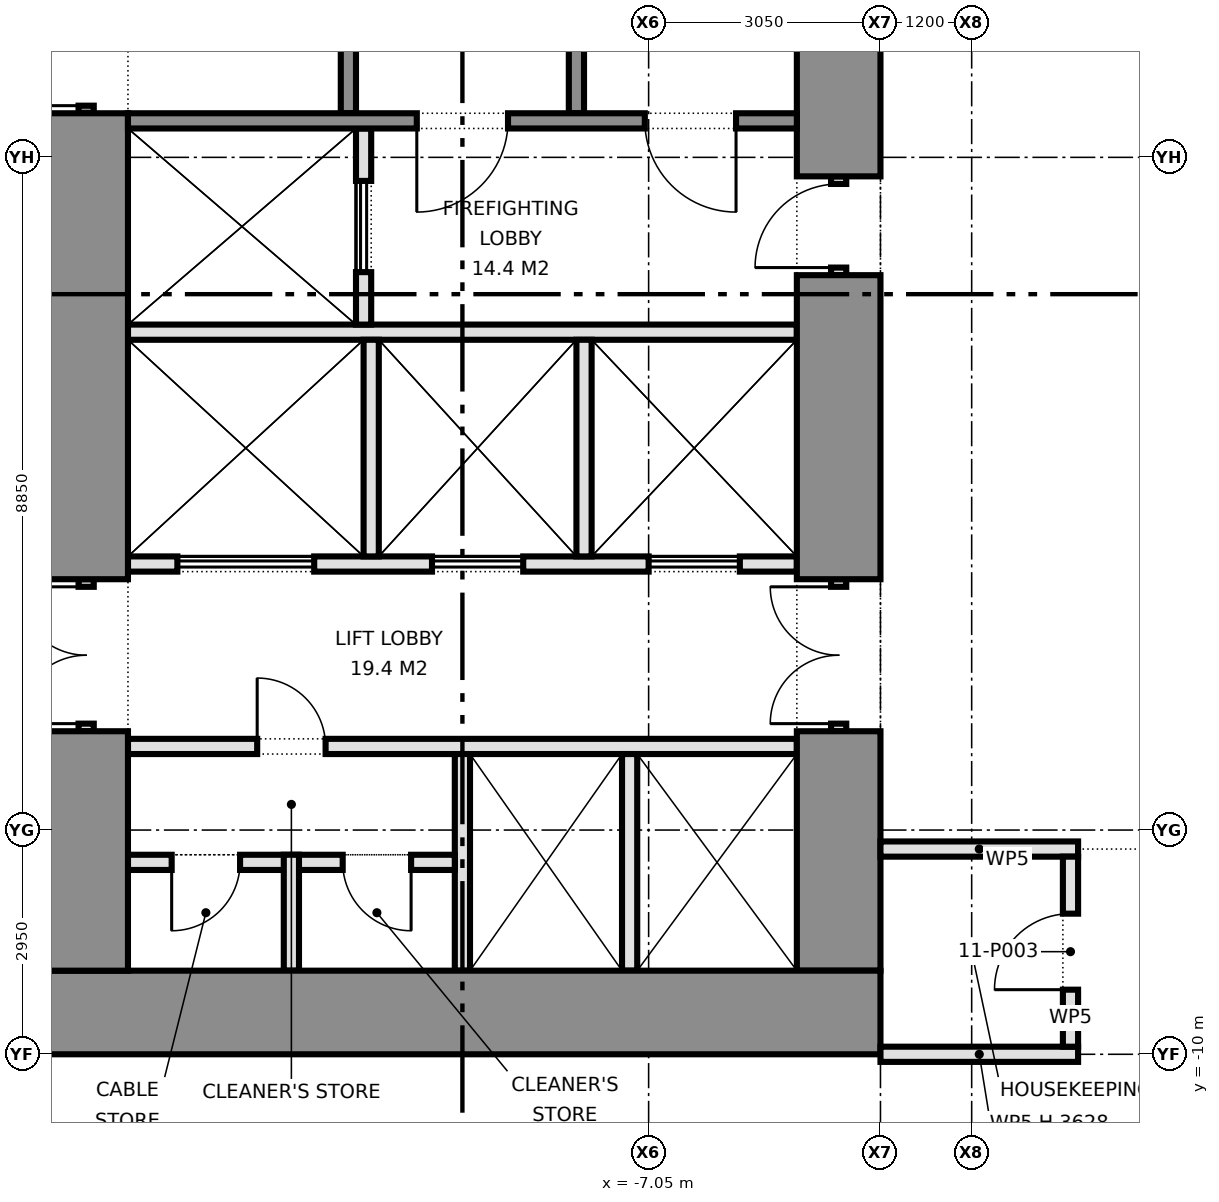
"""IFC4 building model, lengths in metres.
Left out: names, types, materials, properties, quantities, classifications, styles, units other than length and angle.
Written with IfcOpenShell. Run it as: python <this file> out.ifc"""

import sys

from ifc_helpers import new_model, si_unit, direction, frame, frame_2d, origin, place, context, subcontext, project, spatial, rectangle, extrude, element, fill, save


model = new_model("IFC4")
c1 = context("Model", 3, precision=1e-05, world=origin(), true_north=direction((0.0, 1.0)))
c2 = subcontext(c1, "Body", "Model", "MODEL_VIEW")
j1 = project(units=[si_unit("LENGTHUNIT", "METRE"), si_unit("PLANEANGLEUNIT", "RADIAN")], contexts=[c1])
p1 = place(None, origin())
s1 = spatial("IfcSite", under=j1, at=p1, CompositionType="ELEMENT")
p2 = place(p1, origin())
s2 = spatial("IfcBuilding", under=s1, at=p2, CompositionType="ELEMENT")
p3 = place(p2, frame((0.0, 0.0, 49.7)))
s3 = spatial("IfcBuildingStorey", under=s2, at=p3, CompositionType="ELEMENT", Elevation=49.7)
p4 = place(p3, frame((-15.0, -9.45, 0.0), z_axis=(0.0, 0.0, 1.0), x_axis=(1.0, 0.0, 0.0)))
e1 = element("IfcWall", 1, at=p4, inside=s3, PredefinedType="SHEAR", context=c2, shape_type="SweptSolid", body=[
    extrude(rectangle(XDim=11.0, YDim=1.1, at=frame_2d((5.5, 0.0))), origin(), (0.0, 0.0, 1.0), 4.575),
])
p5 = place(p3, frame((-14.45, -8.9, 0.0), z_axis=(0.0, 0.0, 1.0), x_axis=(0.0, 1.0, 0.0)))
e2 = element("IfcWall", 2, at=p5, inside=s3, PredefinedType="SHEAR", context=c2, shape_type="SweptSolid", body=[
    extrude(rectangle(XDim=3.15, YDim=1.1, at=frame_2d((1.575, 0.0))), origin(), (0.0, 0.0, 1.0), 4.575),
])
p6 = place(p3, frame((-14.45, -5.75, 0.0), z_axis=(0.0, 0.0, 1.0), x_axis=(0.0, 1.0, 0.0)))
e3 = element("IfcWall", 3, at=p6, inside=s3, PredefinedType="PARTITIONING", context=c2, shape_type="SweptSolid", body=[
    extrude(rectangle(XDim=2.0, YDim=0.2, at=frame_2d((1.0, 0.0))), origin(), (0.0, 0.0, 1.0), 2.4),
])
p7 = place(p6, frame((0.1, 0.0, 0.0)))
e4 = element("IfcOpeningElement", 4, at=p7, cuts=e3, PredefinedType="OPENING", context=c2, shape_type="SweptSolid", body=[
    extrude(rectangle(XDim=1.8, YDim=2.1, at=frame_2d((0.9, 1.05))), frame((0.0, 0.11, 0.0), z_axis=(0.0, -1.0, 0.0), x_axis=(1.0, 0.0, 0.0)), (0.0, 0.0, 1.0), 0.22),
])
p8 = place(p3, frame((-14.45, -3.75, 0.0), z_axis=(0.0, 0.0, 1.0), x_axis=(0.0, 1.0, 0.0)))
e5 = element("IfcWall", 5, at=p8, inside=s3, PredefinedType="SHEAR", context=c2, shape_type="SweptSolid", body=[
    extrude(rectangle(XDim=6.13, YDim=1.1, at=frame_2d((3.065, 0.0))), origin(), (0.0, 0.0, 1.0), 4.575),
])
p9 = place(p3, frame((-14.45, 2.38, 0.0), z_axis=(0.0, 0.0, 1.0), x_axis=(0.0, 1.0, 0.0)))
e6 = element("IfcWall", 6, at=p9, inside=s3, PredefinedType="SHEAR", context=c2, shape_type="SweptSolid", body=[
    extrude(rectangle(XDim=1.3, YDim=0.2, at=frame_2d((0.65, 0.0))), origin(), (0.0, 0.0, 1.0), 2.4),
])
p10 = place(p9, frame((0.1, 0.0, 0.0)))
e7 = element("IfcOpeningElement", 7, at=p10, cuts=e6, PredefinedType="OPENING", context=c2, shape_type="SweptSolid", body=[
    extrude(rectangle(XDim=1.1, YDim=2.1, at=frame_2d((0.55, 1.05))), frame((0.0, 0.11, 0.0), z_axis=(0.0, -1.0, 0.0), x_axis=(1.0, 0.0, 0.0)), (0.0, 0.0, 1.0), 0.22),
])
p11 = place(p3, frame((-4.55, -8.9, 0.0), z_axis=(0.0, 0.0, 1.0), x_axis=(0.0, 1.0, 0.0)))
e8 = element("IfcWall", 8, at=p11, inside=s3, PredefinedType="SHEAR", context=c2, shape_type="SweptSolid", body=[
    extrude(rectangle(XDim=3.15, YDim=1.1, at=frame_2d((1.575, 0.0))), origin(), (0.0, 0.0, 1.0), 4.575),
])
p12 = place(p3, frame((-4.55, -5.75, 0.0), z_axis=(0.0, 0.0, 1.0), x_axis=(0.0, 1.0, 0.0)))
e9 = element("IfcWall", 9, at=p12, inside=s3, PredefinedType="PARTITIONING", context=c2, shape_type="SweptSolid", body=[
    extrude(rectangle(XDim=2.0, YDim=0.2, at=frame_2d((1.0, 0.0))), origin(), (0.0, 0.0, 1.0), 2.4),
])
p13 = place(p12, frame((0.1, 0.0, 0.0)))
e10 = element("IfcOpeningElement", 10, at=p13, cuts=e9, PredefinedType="OPENING", context=c2, shape_type="SweptSolid", body=[
    extrude(rectangle(XDim=1.8, YDim=2.1, at=frame_2d((0.9, 1.05))), frame((0.0, 0.11, 0.0), z_axis=(0.0, -1.0, 0.0), x_axis=(1.0, 0.0, 0.0)), (0.0, 0.0, 1.0), 0.22),
])
p14 = place(p3, frame((-4.55, -3.75, 0.0), z_axis=(0.0, 0.0, 1.0), x_axis=(0.0, 1.0, 0.0)))
e11 = element("IfcWall", 11, at=p14, inside=s3, PredefinedType="SHEAR", context=c2, shape_type="SweptSolid", body=[
    extrude(rectangle(XDim=4.0, YDim=1.1, at=frame_2d((2.0, 0.0))), origin(), (0.0, 0.0, 1.0), 4.575),
])
p15 = place(p3, frame((-4.55, 0.25, 0.0), z_axis=(0.0, 0.0, 1.0), x_axis=(0.0, 1.0, 0.0)))
e12 = element("IfcWall", 12, at=p15, inside=s3, PredefinedType="PARTITIONING", context=c2, shape_type="SweptSolid", body=[
    extrude(rectangle(XDim=1.3, YDim=0.2, at=frame_2d((0.65, 0.0))), origin(), (0.0, 0.0, 1.0), 2.4),
])
p16 = place(p15, frame((0.1, 0.0, 0.0)))
e13 = element("IfcOpeningElement", 13, at=p16, cuts=e12, PredefinedType="OPENING", context=c2, shape_type="SweptSolid", body=[
    extrude(rectangle(XDim=1.1, YDim=2.1, at=frame_2d((0.55, 1.05))), frame((0.0, 0.11, 0.0), z_axis=(0.0, -1.0, 0.0), x_axis=(1.0, 0.0, 0.0)), (0.0, 0.0, 1.0), 0.22),
])
p17 = place(p3, frame((-4.55, 1.55, 0.0), z_axis=(0.0, 0.0, 1.0), x_axis=(0.0, 1.0, 0.0)))
e14 = element("IfcWall", 14, at=p17, inside=s3, PredefinedType="SHEAR", context=c2, shape_type="SweptSolid", body=[
    extrude(rectangle(XDim=7.35, YDim=1.1, at=frame_2d((3.675, 0.0))), origin(), (0.0, 0.0, 1.0), 4.575),
])
p18 = place(p3, frame((-13.9, -5.95, 0.0), z_axis=(0.0, 0.0, 1.0), x_axis=(1.0, 0.0, 0.0)))
e15 = element("IfcWall", 15, at=p18, inside=s3, PredefinedType="PARTITIONING", context=c2, shape_type="SweptSolid", body=[
    extrude(rectangle(XDim=8.8, YDim=0.2, at=frame_2d((4.4, 0.0))), origin(), (0.0, 0.0, 1.0), 4.575),
])
p19 = place(p18, frame((1.7, 0.0, 0.0)))
e16 = element("IfcOpeningElement", 16, at=p19, cuts=e15, PredefinedType="OPENING", context=c2, shape_type="SweptSolid", body=[
    extrude(rectangle(XDim=0.9, YDim=2.1, at=frame_2d((0.45, 1.05))), frame((0.0, 0.11, 0.0), z_axis=(0.0, -1.0, 0.0), x_axis=(1.0, 0.0, 0.0)), (0.0, 0.0, 1.0), 0.22),
])
p20 = place(p3, frame((-13.9, -3.55, 0.0), z_axis=(0.0, 0.0, 1.0), x_axis=(1.0, 0.0, 0.0)))
e17 = element("IfcWall", 17, at=p20, inside=s3, PredefinedType="PARTITIONING", context=c2, shape_type="SweptSolid", body=[
    extrude(rectangle(XDim=8.8, YDim=0.2, at=frame_2d((4.4, 0.0))), origin(), (0.0, 0.0, 1.0), 4.575),
])
p21 = place(p20, frame((0.65, 0.0, 0.0)))
e18 = element("IfcOpeningElement", 18, at=p21, cuts=e17, PredefinedType="OPENING", context=c2, shape_type="SweptSolid", body=[
    extrude(rectangle(XDim=1.8, YDim=2.1, at=frame_2d((0.9, 1.05))), frame((0.0, 0.11, 0.0), z_axis=(0.0, -1.0, 0.0), x_axis=(1.0, 0.0, 0.0)), (0.0, 0.0, 1.0), 0.22),
])
p22 = place(p20, frame((4.0, 0.0, 0.0)))
e19 = element("IfcOpeningElement", 19, at=p22, cuts=e17, PredefinedType="OPENING", context=c2, shape_type="SweptSolid", body=[
    extrude(rectangle(XDim=1.2, YDim=2.1, at=frame_2d((0.6, 1.05))), frame((0.0, 0.11, 0.0), z_axis=(0.0, -1.0, 0.0), x_axis=(1.0, 0.0, 0.0)), (0.0, 0.0, 1.0), 0.22),
])
p23 = place(p20, frame((6.85, 0.0, 0.0)))
e20 = element("IfcOpeningElement", 20, at=p23, cuts=e17, PredefinedType="OPENING", context=c2, shape_type="SweptSolid", body=[
    extrude(rectangle(XDim=1.2, YDim=2.1, at=frame_2d((0.6, 1.05))), frame((0.0, 0.11, 0.0), z_axis=(0.0, -1.0, 0.0), x_axis=(1.0, 0.0, 0.0)), (0.0, 0.0, 1.0), 0.22),
])
p24 = place(p3, frame((-13.9, -0.5, 0.0), z_axis=(0.0, 0.0, 1.0), x_axis=(1.0, 0.0, 0.0)))
e21 = element("IfcWall", 21, at=p24, inside=s3, PredefinedType="PARTITIONING", context=c2, shape_type="SweptSolid", body=[
    extrude(rectangle(XDim=8.8, YDim=0.2, at=frame_2d((4.4, 0.0))), origin(), (0.0, 0.0, 1.0), 4.575),
])
p25 = place(p3, frame((-10.8, -0.4, 0.0), z_axis=(0.0, 0.0, 1.0), x_axis=(0.0, 1.0, 0.0)))
e22 = element("IfcWall", 22, at=p25, inside=s3, PredefinedType="PARTITIONING", context=c2, shape_type="SweptSolid", body=[
    extrude(rectangle(XDim=2.58, YDim=0.2, at=frame_2d((1.29, 0.0))), origin(), (0.0, 0.0, 1.0), 4.575),
])
p26 = place(p25, frame((0.69, 0.0, 0.0)))
e23 = element("IfcOpeningElement", 23, at=p26, cuts=e22, PredefinedType="OPENING", context=c2, shape_type="SweptSolid", body=[
    extrude(rectangle(XDim=1.2, YDim=2.1, at=frame_2d((0.6, 1.05))), frame((0.0, 0.11, 0.0), z_axis=(0.0, -1.0, 0.0), x_axis=(1.0, 0.0, 0.0)), (0.0, 0.0, 1.0), 0.22),
])
p27 = place(p3, frame((-13.9, 2.28, 0.0), z_axis=(0.0, 0.0, 1.0), x_axis=(1.0, 0.0, 0.0)))
e24 = element("IfcWall", 24, at=p27, inside=s3, PredefinedType="SHEAR", context=c2, shape_type="SweptSolid", body=[
    extrude(rectangle(XDim=8.8, YDim=0.2, at=frame_2d((4.4, 0.0))), origin(), (0.0, 0.0, 1.0), 4.575),
])
p28 = place(p27, frame((3.8, 0.0, 0.0)))
e25 = element("IfcOpeningElement", 25, at=p28, cuts=e24, PredefinedType="OPENING", context=c2, shape_type="SweptSolid", body=[
    extrude(rectangle(XDim=1.2, YDim=2.1, at=frame_2d((0.6, 1.05))), frame((0.0, 0.11, 0.0), z_axis=(0.0, -1.0, 0.0), x_axis=(1.0, 0.0, 0.0)), (0.0, 0.0, 1.0), 0.22),
])
p29 = place(p27, frame((6.8, 0.0, 0.0)))
e26 = element("IfcOpeningElement", 26, at=p29, cuts=e24, PredefinedType="OPENING", context=c2, shape_type="SweptSolid", body=[
    extrude(rectangle(XDim=1.2, YDim=2.1, at=frame_2d((0.6, 1.05))), frame((0.0, 0.11, 0.0), z_axis=(0.0, -1.0, 0.0), x_axis=(1.0, 0.0, 0.0)), (0.0, 0.0, 1.0), 0.22),
])
for number, where, z_axis, x_axis in (
    (27, (-11.0, 2.38, 0.0), (0.0, 0.0, 1.0), (0.0, 1.0, 0.0)),
    (28, (-8.0, 2.38, 0.0), (0.0, 0.0, 1.0), (0.0, 1.0, 0.0)),
):
    element("IfcWall", number, at=place(p3, frame(where, z_axis=z_axis, x_axis=x_axis)), inside=s3, PredefinedType="SHEAR", context=c2, shape_type="SweptSolid", body=[
        extrude(rectangle(XDim=6.52, YDim=0.2, at=frame_2d((3.26, 0.0))), origin(), (0.0, 0.0, 1.0), 4.575),
    ])
for number, where, z_axis, x_axis in (
    (29, (-9.5, -8.9, 0.0), (0.0, 0.0, 1.0), (0.0, 1.0, 0.0)),
    (30, (-7.3, -8.9, 0.0), (0.0, 0.0, 1.0), (0.0, 1.0, 0.0)),
):
    element("IfcWall", number, at=place(p3, frame(where, z_axis=z_axis, x_axis=x_axis)), inside=s3, PredefinedType="PARTITIONING", context=c2, shape_type="SweptSolid", body=[
        extrude(rectangle(XDim=2.85, YDim=0.2, at=frame_2d((1.425, 0.0))), origin(), (0.0, 0.0, 1.0), 4.575),
    ])
p30 = place(p3, frame((-13.9, -7.475, 0.0), z_axis=(0.0, 0.0, 1.0), x_axis=(1.0, 0.0, 0.0)))
e31 = element("IfcWall", 31, at=p30, inside=s3, PredefinedType="PARTITIONING", context=c2, shape_type="SweptSolid", body=[
    extrude(rectangle(XDim=4.3, YDim=0.2, at=frame_2d((2.15, 0.0))), origin(), (0.0, 0.0, 1.0), 4.575),
])
p31 = place(p30, frame((0.575, 0.0, 0.0)))
e32 = element("IfcOpeningElement", 32, at=p31, cuts=e31, PredefinedType="OPENING", context=c2, shape_type="SweptSolid", body=[
    extrude(rectangle(XDim=0.9, YDim=2.1, at=frame_2d((0.45, 1.05))), frame((0.0, 0.11, 0.0), z_axis=(0.0, -1.0, 0.0), x_axis=(1.0, 0.0, 0.0)), (0.0, 0.0, 1.0), 0.22),
])
p32 = place(p30, frame((2.825, 0.0, 0.0)))
e33 = element("IfcOpeningElement", 33, at=p32, cuts=e31, PredefinedType="OPENING", context=c2, shape_type="SweptSolid", body=[
    extrude(rectangle(XDim=0.9, YDim=2.1, at=frame_2d((0.45, 1.05))), frame((0.0, 0.11, 0.0), z_axis=(0.0, -1.0, 0.0), x_axis=(1.0, 0.0, 0.0)), (0.0, 0.0, 1.0), 0.22),
])
p33 = place(p3, frame((-11.75, -8.9, 0.0), z_axis=(0.0, 0.0, 1.0), x_axis=(0.0, 1.0, 0.0)))
e34 = element("IfcWall", 34, at=p33, inside=s3, PredefinedType="PARTITIONING", context=c2, shape_type="SweptSolid", body=[
    extrude(rectangle(XDim=1.525, YDim=0.2, at=frame_2d((0.762, 0.0))), origin(), (0.0, 0.0, 1.0), 4.575),
])
for number, where, z_axis, x_axis in (
    (35, (-10.7, -3.45, 0.0), (0.0, 0.0, 1.0), (0.0, 1.0, 0.0)),
    (36, (-7.9, -3.45, 0.0), (0.0, 0.0, 1.0), (0.0, 1.0, 0.0)),
):
    element("IfcWall", number, at=place(p3, frame(where, z_axis=z_axis, x_axis=x_axis)), inside=s3, PredefinedType="PARTITIONING", context=c2, shape_type="SweptSolid", body=[
        extrude(rectangle(XDim=2.85, YDim=0.2, at=frame_2d((1.425, 0.0))), origin(), (0.0, 0.0, 1.0), 4.575),
    ])
p34 = place(p3, frame((-4.0, -10.0, 0.0), z_axis=(0.0, 0.0, 1.0), x_axis=(1.0, 0.0, 0.0)))
e37 = element("IfcWall", 37, at=p34, inside=s3, PredefinedType="PARTITIONING", context=c2, shape_type="SweptSolid", body=[
    extrude(rectangle(XDim=2.6, YDim=0.2, at=frame_2d((1.3, 0.0))), origin(), (0.0, 0.0, 1.0), 3.628),
])
p35 = place(p3, frame((-4.0, -7.3, 0.0), z_axis=(0.0, 0.0, 1.0), x_axis=(1.0, 0.0, 0.0)))
e38 = element("IfcWall", 38, at=p35, inside=s3, PredefinedType="PARTITIONING", context=c2, shape_type="SweptSolid", body=[
    extrude(rectangle(XDim=2.6, YDim=0.2, at=frame_2d((1.3, 0.0))), origin(), (0.0, 0.0, 1.0), 4.575),
])
p36 = place(p3, frame((-1.5, -9.9, 0.0), z_axis=(0.0, 0.0, 1.0), x_axis=(0.0, 1.0, 0.0)))
e39 = element("IfcWall", 39, at=p36, inside=s3, PredefinedType="PARTITIONING", context=c2, shape_type="SweptSolid", body=[
    extrude(rectangle(XDim=2.5, YDim=0.2, at=frame_2d((1.25, 0.0))), origin(), (0.0, 0.0, 1.0), 4.575),
])
p37 = place(p36, frame((0.75, 0.0, 0.0)))
e40 = element("IfcOpeningElement", 40, at=p37, cuts=e39, PredefinedType="OPENING", context=c2, shape_type="SweptSolid", body=[
    extrude(rectangle(XDim=1.0, YDim=2.1, at=frame_2d((0.5, 1.05))), frame((0.0, 0.11, 0.0), z_axis=(0.0, -1.0, 0.0), x_axis=(1.0, 0.0, 0.0)), (0.0, 0.0, 1.0), 0.22),
])
p38 = place(p7, origin())
e41 = element("IfcDoor", 41, at=p38, inside=s3, OperationType="DOUBLE_DOOR_SINGLE_SWING", PredefinedType="DOOR", context=c2, shape_type="SweptSolid", body=[
    extrude(rectangle(XDim=1.8, YDim=2.1, at=frame_2d((0.9, 1.05))), frame((0.0, 0.025, 0.0), z_axis=(0.0, -1.0, 0.0), x_axis=(1.0, 0.0, 0.0)), (0.0, 0.0, 1.0), 0.05),
])
fill(e4, e41)
p39 = place(p10, origin())
e42 = element("IfcDoor", 42, at=p39, inside=s3, OperationType="SINGLE_SWING_LEFT", PredefinedType="DOOR", context=c2, shape_type="SweptSolid", body=[
    extrude(rectangle(XDim=1.1, YDim=2.1, at=frame_2d((0.55, 1.05))), frame((0.0, 0.025, 0.0), z_axis=(0.0, -1.0, 0.0), x_axis=(1.0, 0.0, 0.0)), (0.0, 0.0, 1.0), 0.05),
])
fill(e7, e42)
p40 = place(p13, origin())
e43 = element("IfcDoor", 43, at=p40, inside=s3, OperationType="DOUBLE_DOOR_SINGLE_SWING", PredefinedType="DOOR", context=c2, shape_type="SweptSolid", body=[
    extrude(rectangle(XDim=1.8, YDim=2.1, at=frame_2d((0.9, 1.05))), frame((0.0, 0.025, 0.0), z_axis=(0.0, -1.0, 0.0), x_axis=(1.0, 0.0, 0.0)), (0.0, 0.0, 1.0), 0.05),
])
fill(e10, e43)
p41 = place(p16, origin())
e44 = element("IfcDoor", 44, at=p41, inside=s3, OperationType="SINGLE_SWING_LEFT", PredefinedType="DOOR", context=c2, shape_type="SweptSolid", body=[
    extrude(rectangle(XDim=1.1, YDim=2.1, at=frame_2d((0.55, 1.05))), frame((0.0, 0.025, 0.0), z_axis=(0.0, -1.0, 0.0), x_axis=(1.0, 0.0, 0.0)), (0.0, 0.0, 1.0), 0.05),
])
fill(e13, e44)
p42 = place(p21, origin())
e45 = element("IfcDoor", 45, at=p42, inside=s3, OperationType="DOUBLE_DOOR_SLIDING", PredefinedType="DOOR", context=c2, shape_type="SweptSolid", body=[
    extrude(rectangle(XDim=1.8, YDim=2.1, at=frame_2d((0.9, 1.05))), frame((0.0, 0.025, 0.0), z_axis=(0.0, -1.0, 0.0), x_axis=(1.0, 0.0, 0.0)), (0.0, 0.0, 1.0), 0.05),
])
fill(e18, e45)
p43 = place(p22, origin())
e46 = element("IfcDoor", 46, at=p43, inside=s3, OperationType="DOUBLE_DOOR_SLIDING", PredefinedType="DOOR", context=c2, shape_type="SweptSolid", body=[
    extrude(rectangle(XDim=1.2, YDim=2.1, at=frame_2d((0.6, 1.05))), frame((0.0, 0.025, 0.0), z_axis=(0.0, -1.0, 0.0), x_axis=(1.0, 0.0, 0.0)), (0.0, 0.0, 1.0), 0.05),
])
fill(e19, e46)
p44 = place(p23, origin())
e47 = element("IfcDoor", 47, at=p44, inside=s3, OperationType="DOUBLE_DOOR_SLIDING", PredefinedType="DOOR", context=c2, shape_type="SweptSolid", body=[
    extrude(rectangle(XDim=1.2, YDim=2.1, at=frame_2d((0.6, 1.05))), frame((0.0, 0.025, 0.0), z_axis=(0.0, -1.0, 0.0), x_axis=(1.0, 0.0, 0.0)), (0.0, 0.0, 1.0), 0.05),
])
fill(e20, e47)
p45 = place(p26, origin())
e48 = element("IfcDoor", 48, at=p45, inside=s3, OperationType="DOUBLE_DOOR_SLIDING", PredefinedType="DOOR", context=c2, shape_type="SweptSolid", body=[
    extrude(rectangle(XDim=1.2, YDim=2.1, at=frame_2d((0.6, 1.05))), frame((0.0, 0.025, 0.0), z_axis=(0.0, -1.0, 0.0), x_axis=(1.0, 0.0, 0.0)), (0.0, 0.0, 1.0), 0.05),
])
fill(e23, e48)
p46 = place(p19, origin())
e49 = element("IfcDoor", 49, at=p46, inside=s3, OperationType="SINGLE_SWING_LEFT", PredefinedType="DOOR", context=c2, shape_type="SweptSolid", body=[
    extrude(rectangle(XDim=0.9, YDim=2.1, at=frame_2d((0.45, 1.05))), frame((0.0, 0.025, 0.0), z_axis=(0.0, -1.0, 0.0), x_axis=(1.0, 0.0, 0.0)), (0.0, 0.0, 1.0), 0.05),
])
fill(e16, e49)
p47 = place(p31, frame((0.9, 0.0, 0.0), z_axis=(0.0, 0.0, 1.0), x_axis=(-1.0, 0.0, 0.0)))
e50 = element("IfcDoor", 50, at=p47, inside=s3, OperationType="SINGLE_SWING_RIGHT", PredefinedType="DOOR", context=c2, shape_type="SweptSolid", body=[
    extrude(rectangle(XDim=0.9, YDim=2.1, at=frame_2d((0.45, 1.05))), frame((0.0, 0.025, 0.0), z_axis=(0.0, -1.0, 0.0), x_axis=(1.0, 0.0, 0.0)), (0.0, 0.0, 1.0), 0.05),
])
fill(e32, e50)
p48 = place(p32, frame((0.9, 0.0, 0.0), z_axis=(0.0, 0.0, 1.0), x_axis=(-1.0, 0.0, 0.0)))
e51 = element("IfcDoor", 51, at=p48, inside=s3, OperationType="SINGLE_SWING_LEFT", PredefinedType="DOOR", context=c2, shape_type="SweptSolid", body=[
    extrude(rectangle(XDim=0.9, YDim=2.1, at=frame_2d((0.45, 1.05))), frame((0.0, 0.025, 0.0), z_axis=(0.0, -1.0, 0.0), x_axis=(1.0, 0.0, 0.0)), (0.0, 0.0, 1.0), 0.05),
])
fill(e33, e51)
p49 = place(p28, frame((1.2, 0.0, 0.0), z_axis=(0.0, 0.0, 1.0), x_axis=(-1.0, 0.0, 0.0)))
e52 = element("IfcDoor", 52, at=p49, inside=s3, OperationType="SINGLE_SWING_RIGHT", PredefinedType="DOOR", context=c2, shape_type="SweptSolid", body=[
    extrude(rectangle(XDim=1.2, YDim=2.1, at=frame_2d((0.6, 1.05))), frame((0.0, 0.025, 0.0), z_axis=(0.0, -1.0, 0.0), x_axis=(1.0, 0.0, 0.0)), (0.0, 0.0, 1.0), 0.05),
])
fill(e25, e52)
p50 = place(p29, frame((1.2, 0.0, 0.0), z_axis=(0.0, 0.0, 1.0), x_axis=(-1.0, 0.0, 0.0)))
e53 = element("IfcDoor", 53, at=p50, inside=s3, OperationType="SINGLE_SWING_LEFT", PredefinedType="DOOR", context=c2, shape_type="SweptSolid", body=[
    extrude(rectangle(XDim=1.2, YDim=2.1, at=frame_2d((0.6, 1.05))), frame((0.0, 0.025, 0.0), z_axis=(0.0, -1.0, 0.0), x_axis=(1.0, 0.0, 0.0)), (0.0, 0.0, 1.0), 0.05),
])
fill(e26, e53)
p51 = place(p37, origin())
e54 = element("IfcDoor", 54, at=p51, inside=s3, OperationType="SINGLE_SWING_LEFT", PredefinedType="DOOR", context=c2, shape_type="SweptSolid", body=[
    extrude(rectangle(XDim=1.0, YDim=2.1, at=frame_2d((0.5, 1.05))), frame((0.0, 0.025, 0.0), z_axis=(0.0, -1.0, 0.0), x_axis=(1.0, 0.0, 0.0)), (0.0, 0.0, 1.0), 0.05),
])
fill(e40, e54)
save(model, sys.argv[1])
